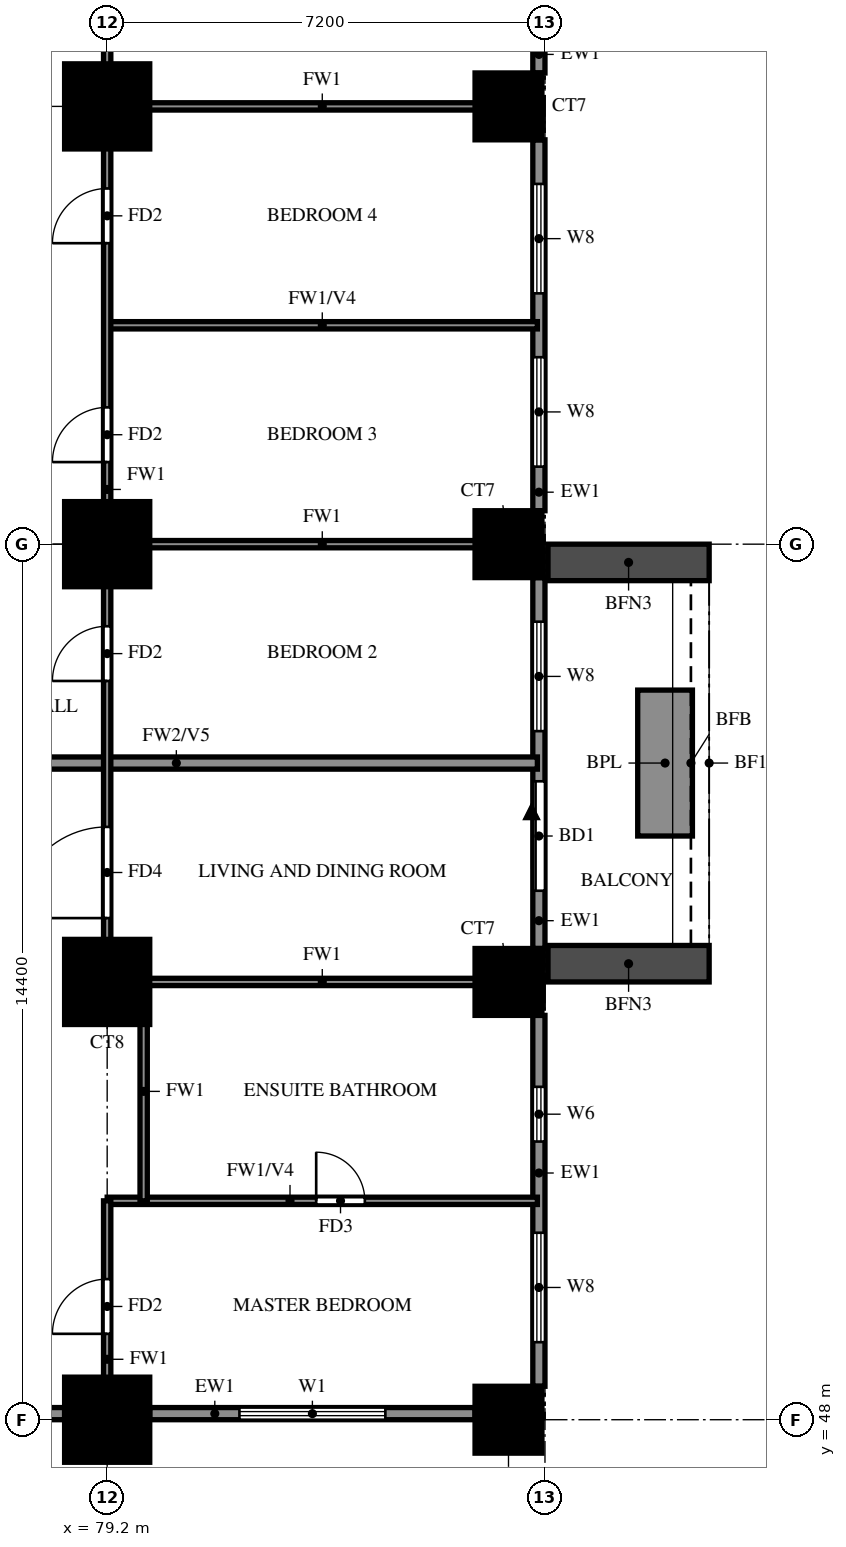
"""IFC4 building model, lengths in metres.
Left out: names, types, materials, properties, quantities, classifications, styles, units other than length and angle.
Written with IfcOpenShell. Run it as: python <this file> out.ifc"""

import sys

from ifc_helpers import new_model, si_unit, direction, frame, frame_2d, origin, origin_2d, place, context, subcontext, project, spatial, rectangle, extrude, source, transform, mapped, element, fill, save


model = new_model("IFC4")
c1 = context("Model", 3, precision=1e-05, world=origin(), true_north=direction((0.0, 1.0)))
c2 = subcontext(c1, "Body", "Model", "MODEL_VIEW")
j1 = project(units=[si_unit("LENGTHUNIT", "METRE"), si_unit("PLANEANGLEUNIT", "RADIAN")], contexts=[c1])
p1 = place(None, origin())
s1 = spatial("IfcSite", under=j1, at=p1, CompositionType="ELEMENT")
p2 = place(p1, origin())
s2 = spatial("IfcBuilding", under=s1, at=p2, CompositionType="ELEMENT")
p3 = place(p2, frame((0.0, 0.0, 30.5)))
s3 = spatial("IfcBuildingStorey", under=s2, at=p3, CompositionType="ELEMENT", Elevation=30.5)
m1 = source(origin(), c2, "Body", "SweptSolid", [
    extrude(rectangle(XDim=1.4, YDim=1.4, at=origin_2d()), origin(), (0.0, 0.0, 1.0), 3.18),
])
p4 = place(p3, frame((79.2, 48.0, 0.0), z_axis=(0.0, 0.0, 1.0), x_axis=(1.0, 0.0, 0.0)))
e1 = element("IfcColumn", 1, at=p4, inside=s3, PredefinedType="COLUMN", context=c2, shape_type="MappedRepresentation", body=[
    mapped(m1, transform((0.0, 0.0, 0.0))),
])
m2 = source(origin(), c2, "Body", "SweptSolid", [
    extrude(rectangle(XDim=1.1, YDim=1.1, at=origin_2d()), origin(), (0.0, 0.0, 1.0), 3.18),
])
p5 = place(p3, frame((85.8, 48.0, 0.0), z_axis=(0.0, 0.0, 1.0), x_axis=(1.0, 0.0, 0.0)))
e2 = element("IfcColumn", 2, at=p5, inside=s3, PredefinedType="COLUMN", context=c2, shape_type="MappedRepresentation", body=[
    mapped(m2, transform((0.0, 0.0, 0.0))),
])
p6 = place(p3, frame((79.2, 55.2, 0.0), z_axis=(0.0, 0.0, 1.0), x_axis=(1.0, 0.0, 0.0)))
e3 = element("IfcColumn", 3, at=p6, inside=s3, PredefinedType="COLUMN", context=c2, shape_type="MappedRepresentation", body=[
    mapped(m1, transform((0.0, 0.0, 0.0))),
])
p7 = place(p3, frame((85.8, 55.2, 0.0), z_axis=(0.0, 0.0, 1.0), x_axis=(1.0, 0.0, 0.0)))
e4 = element("IfcColumn", 4, at=p7, inside=s3, PredefinedType="COLUMN", context=c2, shape_type="MappedRepresentation", body=[
    mapped(m2, transform((0.0, 0.0, 0.0))),
])
p8 = place(p3, frame((79.2, 62.4, 0.0), z_axis=(0.0, 0.0, 1.0), x_axis=(1.0, 0.0, 0.0)))
e5 = element("IfcColumn", 5, at=p8, inside=s3, PredefinedType="COLUMN", context=c2, shape_type="MappedRepresentation", body=[
    mapped(m1, transform((0.0, 0.0, 0.0))),
])
p9 = place(p3, frame((85.8, 62.4, 0.0), z_axis=(0.0, 0.0, 1.0), x_axis=(1.0, 0.0, 0.0)))
e6 = element("IfcColumn", 6, at=p9, inside=s3, PredefinedType="COLUMN", context=c2, shape_type="MappedRepresentation", body=[
    mapped(m2, transform((0.0, 0.0, 0.0))),
])
p10 = place(p3, frame((79.2, 69.6, 0.0), z_axis=(0.0, 0.0, 1.0), x_axis=(1.0, 0.0, 0.0)))
e7 = element("IfcColumn", 7, at=p10, inside=s3, PredefinedType="COLUMN", context=c2, shape_type="MappedRepresentation", body=[
    mapped(m1, transform((0.0, 0.0, 0.0))),
])
p11 = place(p3, frame((85.8, 69.6, 0.0), z_axis=(0.0, 0.0, 1.0), x_axis=(1.0, 0.0, 0.0)))
e8 = element("IfcColumn", 8, at=p11, inside=s3, PredefinedType="COLUMN", context=c2, shape_type="MappedRepresentation", body=[
    mapped(m2, transform((0.0, 0.0, 0.0))),
])
p12 = place(p3, frame((78.74, 41.118, 0.0), z_axis=(0.0, 0.0, 1.0), x_axis=(-0.707106781187, 0.707106781187, 0.0)))
e9 = element("IfcWall", 9, at=p12, inside=s3, PredefinedType="SOLIDWALL", context=c2, shape_type="SweptSolid", body=[
    extrude(rectangle(XDim=9.874, YDim=0.2, at=frame_2d((4.937, 0.0))), origin(), (0.0, 0.0, 1.0), 3.18),
])
p13 = place(p3, frame((71.989, 48.1, 0.0), z_axis=(0.0, 0.0, 1.0), x_axis=(1.0, 0.0, 0.0)))
e10 = element("IfcWall", 10, at=p13, inside=s3, PredefinedType="SOLIDWALL", context=c2, shape_type="SweptSolid", body=[
    extrude(rectangle(XDim=6.511, YDim=0.2, at=frame_2d((3.256, 0.0))), origin(), (0.0, 0.0, 1.0), 3.18),
])
p14 = place(p13, frame((2.206, 0.0, 1.5)))
e11 = element("IfcOpeningElement", 11, at=p14, cuts=e10, PredefinedType="OPENING", context=c2, shape_type="SweptSolid", body=[
    extrude(rectangle(XDim=0.9, YDim=0.9, at=frame_2d((0.45, 0.45))), frame((0.0, 0.11, 0.0), z_axis=(0.0, -1.0, 0.0), x_axis=(1.0, 0.0, 0.0)), (0.0, 0.0, 1.0), 0.22),
])
p15 = place(p3, frame((79.9, 48.1, 0.0), z_axis=(0.0, 0.0, 1.0), x_axis=(1.0, 0.0, 0.0)))
e12 = element("IfcWall", 12, at=p15, inside=s3, PredefinedType="SOLIDWALL", context=c2, shape_type="SweptSolid", body=[
    extrude(rectangle(XDim=5.35, YDim=0.2, at=frame_2d((2.675, 0.0))), origin(), (0.0, 0.0, 1.0), 3.18),
])
p16 = place(p15, frame((1.475, 0.0, 0.6)))
e13 = element("IfcOpeningElement", 13, at=p16, cuts=e12, PredefinedType="OPENING", context=c2, shape_type="SweptSolid", body=[
    extrude(rectangle(XDim=2.4, YDim=2.4, at=frame_2d((1.2, 1.2))), frame((0.0, 0.11, 0.0), z_axis=(0.0, -1.0, 0.0), x_axis=(1.0, 0.0, 0.0)), (0.0, 0.0, 1.0), 0.22),
])
p17 = place(p3, frame((86.3, 48.55, 0.0), z_axis=(0.0, 0.0, 1.0), x_axis=(0.0, 1.0, 0.0)))
e14 = element("IfcWall", 14, at=p17, inside=s3, PredefinedType="SOLIDWALL", context=c2, shape_type="SweptSolid", body=[
    extrude(rectangle(XDim=6.1, YDim=0.2, at=frame_2d((3.05, 0.0))), origin(), (0.0, 0.0, 1.0), 3.18),
])
p18 = place(p17, frame((0.725, 0.0, 0.6)))
e15 = element("IfcOpeningElement", 15, at=p18, cuts=e14, PredefinedType="OPENING", context=c2, shape_type="SweptSolid", body=[
    extrude(rectangle(XDim=1.8, YDim=2.4, at=frame_2d((0.9, 1.2))), frame((0.0, 0.11, 0.0), z_axis=(0.0, -1.0, 0.0), x_axis=(1.0, 0.0, 0.0)), (0.0, 0.0, 1.0), 0.22),
])
p19 = place(p17, frame((4.025, 0.0, 1.5)))
e16 = element("IfcOpeningElement", 16, at=p19, cuts=e14, PredefinedType="OPENING", context=c2, shape_type="SweptSolid", body=[
    extrude(rectangle(XDim=0.9, YDim=0.9, at=frame_2d((0.45, 0.45))), frame((0.0, 0.11, 0.0), z_axis=(0.0, -1.0, 0.0), x_axis=(1.0, 0.0, 0.0)), (0.0, 0.0, 1.0), 0.22),
])
p20 = place(p3, frame((86.3, 55.75, 0.0), z_axis=(0.0, 0.0, 1.0), x_axis=(0.0, 1.0, 0.0)))
e17 = element("IfcWall", 17, at=p20, inside=s3, PredefinedType="SOLIDWALL", context=c2, shape_type="SweptSolid", body=[
    extrude(rectangle(XDim=6.1, YDim=0.2, at=frame_2d((3.05, 0.0))), origin(), (0.0, 0.0, 1.0), 3.18),
])
p21 = place(p20, frame((0.95, 0.0, 0.0)))
e18 = element("IfcOpeningElement", 18, at=p21, cuts=e17, PredefinedType="OPENING", context=c2, shape_type="SweptSolid", body=[
    extrude(rectangle(XDim=1.8, YDim=2.4, at=frame_2d((0.9, 1.2))), frame((0.0, 0.11, 0.0), z_axis=(0.0, -1.0, 0.0), x_axis=(1.0, 0.0, 0.0)), (0.0, 0.0, 1.0), 0.22),
])
p22 = place(p20, frame((3.575, 0.0, 0.6)))
e19 = element("IfcOpeningElement", 19, at=p22, cuts=e17, PredefinedType="OPENING", context=c2, shape_type="SweptSolid", body=[
    extrude(rectangle(XDim=1.8, YDim=2.4, at=frame_2d((0.9, 1.2))), frame((0.0, 0.11, 0.0), z_axis=(0.0, -1.0, 0.0), x_axis=(1.0, 0.0, 0.0)), (0.0, 0.0, 1.0), 0.22),
])
p23 = place(p3, frame((86.3, 62.95, 0.0), z_axis=(0.0, 0.0, 1.0), x_axis=(0.0, 1.0, 0.0)))
e20 = element("IfcWall", 20, at=p23, inside=s3, PredefinedType="SOLIDWALL", context=c2, shape_type="SweptSolid", body=[
    extrude(rectangle(XDim=6.1, YDim=0.2, at=frame_2d((3.05, 0.0))), origin(), (0.0, 0.0, 1.0), 3.18),
])
p24 = place(p23, frame((0.725, 0.0, 0.6)))
e21 = element("IfcOpeningElement", 21, at=p24, cuts=e20, PredefinedType="OPENING", context=c2, shape_type="SweptSolid", body=[
    extrude(rectangle(XDim=1.8, YDim=2.4, at=frame_2d((0.9, 1.2))), frame((0.0, 0.11, 0.0), z_axis=(0.0, -1.0, 0.0), x_axis=(1.0, 0.0, 0.0)), (0.0, 0.0, 1.0), 0.22),
])
p25 = place(p23, frame((3.575, 0.0, 0.6)))
e22 = element("IfcOpeningElement", 22, at=p25, cuts=e20, PredefinedType="OPENING", context=c2, shape_type="SweptSolid", body=[
    extrude(rectangle(XDim=1.8, YDim=2.4, at=frame_2d((0.9, 1.2))), frame((0.0, 0.11, 0.0), z_axis=(0.0, -1.0, 0.0), x_axis=(1.0, 0.0, 0.0)), (0.0, 0.0, 1.0), 0.22),
])
p26 = place(p3, frame((86.3, 70.15, 0.0), z_axis=(0.0, 0.0, 1.0), x_axis=(0.0, 1.0, 0.0)))
e23 = element("IfcWall", 23, at=p26, inside=s3, PredefinedType="SOLIDWALL", context=c2, shape_type="SweptSolid", body=[
    extrude(rectangle(XDim=6.1, YDim=0.2, at=frame_2d((3.05, 0.0))), origin(), (0.0, 0.0, 1.0), 3.18),
])
p27 = place(p26, frame((0.725, 0.0, 0.6)))
e24 = element("IfcOpeningElement", 24, at=p27, cuts=e23, PredefinedType="OPENING", context=c2, shape_type="SweptSolid", body=[
    extrude(rectangle(XDim=1.8, YDim=2.4, at=frame_2d((0.9, 1.2))), frame((0.0, 0.11, 0.0), z_axis=(0.0, -1.0, 0.0), x_axis=(1.0, 0.0, 0.0)), (0.0, 0.0, 1.0), 0.22),
])
p28 = place(p26, frame((3.575, 0.0, 0.6)))
e25 = element("IfcOpeningElement", 25, at=p28, cuts=e23, PredefinedType="OPENING", context=c2, shape_type="SweptSolid", body=[
    extrude(rectangle(XDim=1.8, YDim=2.4, at=frame_2d((0.9, 1.2))), frame((0.0, 0.11, 0.0), z_axis=(0.0, -1.0, 0.0), x_axis=(1.0, 0.0, 0.0)), (0.0, 0.0, 1.0), 0.22),
])
for number, where, z_axis, x_axis in (
    (26, (86.45, 55.5, 0.0), (0.0, 0.0, 1.0), (1.0, 0.0, 0.0)),
    (27, (86.45, 62.1, 0.0), (0.0, 0.0, 1.0), (1.0, 0.0, 0.0)),
):
    element("IfcWall", number, at=place(p3, frame(where, z_axis=z_axis, x_axis=x_axis)), inside=s3, PredefinedType="SOLIDWALL", context=c2, shape_type="SweptSolid", body=[
        extrude(rectangle(XDim=2.65, YDim=0.6, at=frame_2d((1.325, 0.0))), origin(), (0.0, 0.0, 1.0), 2.85),
    ])
p29 = place(p3, frame((88.375, 57.6, 0.0), z_axis=(0.0, 0.0, 1.0), x_axis=(0.0, 1.0, 0.0)))
e28 = element("IfcWall", 28, at=p29, inside=s3, PredefinedType="SOLIDWALL", context=c2, shape_type="SweptSolid", body=[
    extrude(rectangle(XDim=2.4, YDim=0.9, at=frame_2d((1.2, 0.0))), origin(), (0.0, 0.0, 1.0), 0.9),
])
p30 = place(p3, frame((74.4, 58.8, 0.0), z_axis=(0.0, 0.0, 1.0), x_axis=(1.0, 0.0, 0.0)))
e29 = element("IfcWall", 29, at=p30, inside=s3, PredefinedType="SOLIDWALL", context=c2, shape_type="SweptSolid", body=[
    extrude(rectangle(XDim=11.875, YDim=0.2, at=frame_2d((5.938, 0.0))), origin(), (0.0, 0.0, 1.0), 2.28),
])
p31 = place(p3, frame((79.2, 51.6, 0.0), z_axis=(0.0, 0.0, 1.0), x_axis=(1.0, 0.0, 0.0)))
e30 = element("IfcWall", 30, at=p31, inside=s3, PredefinedType="PARTITIONING", context=c2, shape_type="SweptSolid", body=[
    extrude(rectangle(XDim=7.075, YDim=0.12, at=frame_2d((3.538, 0.0))), origin(), (0.0, 0.0, 1.0), 2.28),
])
p32 = place(p31, frame((3.438, 0.0, 0.0)))
e31 = element("IfcOpeningElement", 31, at=p32, cuts=e30, PredefinedType="OPENING", context=c2, shape_type="SweptSolid", body=[
    extrude(rectangle(XDim=0.8, YDim=2.1, at=frame_2d((0.4, 1.05))), frame((0.0, 0.07, 0.0), z_axis=(0.0, -1.0, 0.0), x_axis=(1.0, 0.0, 0.0)), (0.0, 0.0, 1.0), 0.14),
])
for number, where, z_axis, x_axis in (
    (32, (79.2, 55.2, 0.0), (0.0, 0.0, 1.0), (1.0, 0.0, 0.0)),
    (33, (79.2, 62.4, 0.0), (0.0, 0.0, 1.0), (1.0, 0.0, 0.0)),
):
    element("IfcWall", number, at=place(p3, frame(where, z_axis=z_axis, x_axis=x_axis)), inside=s3, PredefinedType="PARTITIONING", context=c2, shape_type="SweptSolid", body=[
        extrude(rectangle(XDim=7.075, YDim=0.12, at=frame_2d((3.538, 0.0))), origin(), (0.0, 0.0, 1.0), 3.18),
    ])
p33 = place(p3, frame((79.2, 66.0, 0.0), z_axis=(0.0, 0.0, 1.0), x_axis=(1.0, 0.0, 0.0)))
e34 = element("IfcWall", 34, at=p33, inside=s3, PredefinedType="PARTITIONING", context=c2, shape_type="SweptSolid", body=[
    extrude(rectangle(XDim=7.075, YDim=0.12, at=frame_2d((3.538, 0.0))), origin(), (0.0, 0.0, 1.0), 2.28),
])
p34 = place(p3, frame((79.2, 69.6, 0.0), z_axis=(0.0, 0.0, 1.0), x_axis=(1.0, 0.0, 0.0)))
e35 = element("IfcWall", 35, at=p34, inside=s3, PredefinedType="PARTITIONING", context=c2, shape_type="SweptSolid", body=[
    extrude(rectangle(XDim=7.075, YDim=0.12, at=frame_2d((3.538, 0.0))), origin(), (0.0, 0.0, 1.0), 3.18),
])
p35 = place(p3, frame((79.2, 48.125, 0.0), z_axis=(0.0, 0.0, 1.0), x_axis=(0.0, 1.0, 0.0)))
e36 = element("IfcWall", 36, at=p35, inside=s3, PredefinedType="PARTITIONING", context=c2, shape_type="SweptSolid", body=[
    extrude(rectangle(XDim=3.475, YDim=0.12, at=frame_2d((1.738, 0.0))), origin(), (0.0, 0.0, 1.0), 3.18),
])
p36 = place(p35, frame((1.288, 0.0, 0.0)))
e37 = element("IfcOpeningElement", 37, at=p36, cuts=e36, PredefinedType="OPENING", context=c2, shape_type="SweptSolid", body=[
    extrude(rectangle(XDim=0.9, YDim=2.1, at=frame_2d((0.45, 1.05))), frame((0.0, 0.07, 0.0), z_axis=(0.0, -1.0, 0.0), x_axis=(1.0, 0.0, 0.0)), (0.0, 0.0, 1.0), 0.14),
])
p37 = place(p3, frame((79.2, 55.2, 0.0), z_axis=(0.0, 0.0, 1.0), x_axis=(0.0, 1.0, 0.0)))
e38 = element("IfcWall", 38, at=p37, inside=s3, PredefinedType="PARTITIONING", context=c2, shape_type="SweptSolid", body=[
    extrude(rectangle(XDim=18.0, YDim=0.12, at=frame_2d((9.0, 0.0))), origin(), (0.0, 0.0, 1.0), 3.18),
])
p38 = place(p37, frame((1.05, 0.0, 0.0)))
e39 = element("IfcOpeningElement", 39, at=p38, cuts=e38, PredefinedType="OPENING", context=c2, shape_type="SweptSolid", body=[
    extrude(rectangle(XDim=1.5, YDim=2.1, at=frame_2d((0.75, 1.05))), frame((0.0, 0.07, 0.0), z_axis=(0.0, -1.0, 0.0), x_axis=(1.0, 0.0, 0.0)), (0.0, 0.0, 1.0), 0.14),
])
p39 = place(p37, frame((4.95, 0.0, 0.0)))
e40 = element("IfcOpeningElement", 40, at=p39, cuts=e38, PredefinedType="OPENING", context=c2, shape_type="SweptSolid", body=[
    extrude(rectangle(XDim=0.9, YDim=2.1, at=frame_2d((0.45, 1.05))), frame((0.0, 0.07, 0.0), z_axis=(0.0, -1.0, 0.0), x_axis=(1.0, 0.0, 0.0)), (0.0, 0.0, 1.0), 0.14),
])
p40 = place(p37, frame((8.55, 0.0, 0.0)))
e41 = element("IfcOpeningElement", 41, at=p40, cuts=e38, PredefinedType="OPENING", context=c2, shape_type="SweptSolid", body=[
    extrude(rectangle(XDim=0.9, YDim=2.1, at=frame_2d((0.45, 1.05))), frame((0.0, 0.07, 0.0), z_axis=(0.0, -1.0, 0.0), x_axis=(1.0, 0.0, 0.0)), (0.0, 0.0, 1.0), 0.14),
])
p41 = place(p37, frame((12.15, 0.0, 0.0)))
e42 = element("IfcOpeningElement", 42, at=p41, cuts=e38, PredefinedType="OPENING", context=c2, shape_type="SweptSolid", body=[
    extrude(rectangle(XDim=0.9, YDim=2.1, at=frame_2d((0.45, 1.05))), frame((0.0, 0.07, 0.0), z_axis=(0.0, -1.0, 0.0), x_axis=(1.0, 0.0, 0.0)), (0.0, 0.0, 1.0), 0.14),
])
p42 = place(p37, frame((15.75, 0.0, 0.0)))
e43 = element("IfcOpeningElement", 43, at=p42, cuts=e38, PredefinedType="OPENING", context=c2, shape_type="SweptSolid", body=[
    extrude(rectangle(XDim=0.9, YDim=2.1, at=frame_2d((0.45, 1.05))), frame((0.0, 0.07, 0.0), z_axis=(0.0, -1.0, 0.0), x_axis=(1.0, 0.0, 0.0)), (0.0, 0.0, 1.0), 0.14),
])
p43 = place(p3, frame((79.8, 51.6, 0.0), z_axis=(0.0, 0.0, 1.0), x_axis=(0.0, 1.0, 0.0)))
e44 = element("IfcWall", 44, at=p43, inside=s3, PredefinedType="PARTITIONING", context=c2, shape_type="SweptSolid", body=[
    extrude(rectangle(XDim=3.6, YDim=0.12, at=frame_2d((1.8, 0.0))), origin(), (0.0, 0.0, 1.0), 3.18),
])
p44 = place(p16, origin())
e45 = element("IfcWindow", 45, at=p44, inside=s3, PartitioningType="DOUBLE_PANEL_VERTICAL", PredefinedType="WINDOW", context=c2, shape_type="SweptSolid", body=[
    extrude(rectangle(XDim=2.4, YDim=2.4, at=frame_2d((1.2, 1.2))), frame((0.0, 0.03, 0.0), z_axis=(0.0, -1.0, 0.0), x_axis=(1.0, 0.0, 0.0)), (0.0, 0.0, 1.0), 0.06),
])
fill(e13, e45)
p45 = place(p18, origin())
e46 = element("IfcWindow", 46, at=p45, inside=s3, PartitioningType="DOUBLE_PANEL_VERTICAL", PredefinedType="WINDOW", context=c2, shape_type="SweptSolid", body=[
    extrude(rectangle(XDim=1.8, YDim=2.4, at=frame_2d((0.9, 1.2))), frame((0.0, 0.03, 0.0), z_axis=(0.0, -1.0, 0.0), x_axis=(1.0, 0.0, 0.0)), (0.0, 0.0, 1.0), 0.06),
])
fill(e15, e46)
p46 = place(p19, origin())
e47 = element("IfcWindow", 47, at=p46, inside=s3, PartitioningType="SINGLE_PANEL", PredefinedType="WINDOW", context=c2, shape_type="SweptSolid", body=[
    extrude(rectangle(XDim=0.9, YDim=0.9, at=frame_2d((0.45, 0.45))), frame((0.0, 0.03, 0.0), z_axis=(0.0, -1.0, 0.0), x_axis=(1.0, 0.0, 0.0)), (0.0, 0.0, 1.0), 0.06),
])
fill(e16, e47)
p47 = place(p21, origin())
e48 = element("IfcDoor", 48, at=p47, inside=s3, OperationType="DOUBLE_DOOR_SLIDING", PredefinedType="DOOR", context=c2, shape_type="SweptSolid", body=[
    extrude(rectangle(XDim=1.8, YDim=2.4, at=frame_2d((0.9, 1.2))), frame((0.0, 0.025, 0.0), z_axis=(0.0, -1.0, 0.0), x_axis=(1.0, 0.0, 0.0)), (0.0, 0.0, 1.0), 0.05),
])
fill(e18, e48)
p48 = place(p22, origin())
e49 = element("IfcWindow", 49, at=p48, inside=s3, PartitioningType="DOUBLE_PANEL_VERTICAL", PredefinedType="WINDOW", context=c2, shape_type="SweptSolid", body=[
    extrude(rectangle(XDim=1.8, YDim=2.4, at=frame_2d((0.9, 1.2))), frame((0.0, 0.03, 0.0), z_axis=(0.0, -1.0, 0.0), x_axis=(1.0, 0.0, 0.0)), (0.0, 0.0, 1.0), 0.06),
])
fill(e19, e49)
p49 = place(p24, origin())
e50 = element("IfcWindow", 50, at=p49, inside=s3, PartitioningType="DOUBLE_PANEL_VERTICAL", PredefinedType="WINDOW", context=c2, shape_type="SweptSolid", body=[
    extrude(rectangle(XDim=1.8, YDim=2.4, at=frame_2d((0.9, 1.2))), frame((0.0, 0.03, 0.0), z_axis=(0.0, -1.0, 0.0), x_axis=(1.0, 0.0, 0.0)), (0.0, 0.0, 1.0), 0.06),
])
fill(e21, e50)
p50 = place(p25, origin())
e51 = element("IfcWindow", 51, at=p50, inside=s3, PartitioningType="DOUBLE_PANEL_VERTICAL", PredefinedType="WINDOW", context=c2, shape_type="SweptSolid", body=[
    extrude(rectangle(XDim=1.8, YDim=2.4, at=frame_2d((0.9, 1.2))), frame((0.0, 0.03, 0.0), z_axis=(0.0, -1.0, 0.0), x_axis=(1.0, 0.0, 0.0)), (0.0, 0.0, 1.0), 0.06),
])
fill(e22, e51)
p51 = place(p36, origin())
e52 = element("IfcDoor", 52, at=p51, inside=s3, OperationType="SINGLE_SWING_RIGHT", PredefinedType="DOOR", context=c2, shape_type="SweptSolid", body=[
    extrude(rectangle(XDim=0.9, YDim=2.1, at=frame_2d((0.45, 1.05))), frame((0.0, 0.025, 0.0), z_axis=(0.0, -1.0, 0.0), x_axis=(1.0, 0.0, 0.0)), (0.0, 0.0, 1.0), 0.05),
])
fill(e37, e52)
p52 = place(p32, origin())
e53 = element("IfcDoor", 53, at=p52, inside=s3, OperationType="SINGLE_SWING_LEFT", PredefinedType="DOOR", context=c2, shape_type="SweptSolid", body=[
    extrude(rectangle(XDim=0.8, YDim=2.1, at=frame_2d((0.4, 1.05))), frame((0.0, 0.025, 0.0), z_axis=(0.0, -1.0, 0.0), x_axis=(1.0, 0.0, 0.0)), (0.0, 0.0, 1.0), 0.05),
])
fill(e31, e53)
p53 = place(p38, origin())
e54 = element("IfcDoor", 54, at=p53, inside=s3, OperationType="SINGLE_SWING_LEFT", PredefinedType="DOOR", context=c2, shape_type="SweptSolid", body=[
    extrude(rectangle(XDim=1.5, YDim=2.1, at=frame_2d((0.75, 1.05))), frame((0.0, 0.025, 0.0), z_axis=(0.0, -1.0, 0.0), x_axis=(1.0, 0.0, 0.0)), (0.0, 0.0, 1.0), 0.05),
])
fill(e39, e54)
p54 = place(p39, origin())
e55 = element("IfcDoor", 55, at=p54, inside=s3, OperationType="SINGLE_SWING_LEFT", PredefinedType="DOOR", context=c2, shape_type="SweptSolid", body=[
    extrude(rectangle(XDim=0.9, YDim=2.1, at=frame_2d((0.45, 1.05))), frame((0.0, 0.025, 0.0), z_axis=(0.0, -1.0, 0.0), x_axis=(1.0, 0.0, 0.0)), (0.0, 0.0, 1.0), 0.05),
])
fill(e40, e55)
p55 = place(p40, origin())
e56 = element("IfcDoor", 56, at=p55, inside=s3, OperationType="SINGLE_SWING_RIGHT", PredefinedType="DOOR", context=c2, shape_type="SweptSolid", body=[
    extrude(rectangle(XDim=0.9, YDim=2.1, at=frame_2d((0.45, 1.05))), frame((0.0, 0.025, 0.0), z_axis=(0.0, -1.0, 0.0), x_axis=(1.0, 0.0, 0.0)), (0.0, 0.0, 1.0), 0.05),
])
fill(e41, e56)
p56 = place(p41, origin())
e57 = element("IfcDoor", 57, at=p56, inside=s3, OperationType="SINGLE_SWING_LEFT", PredefinedType="DOOR", context=c2, shape_type="SweptSolid", body=[
    extrude(rectangle(XDim=0.9, YDim=2.1, at=frame_2d((0.45, 1.05))), frame((0.0, 0.025, 0.0), z_axis=(0.0, -1.0, 0.0), x_axis=(1.0, 0.0, 0.0)), (0.0, 0.0, 1.0), 0.05),
])
fill(e42, e57)
save(model, sys.argv[1])
